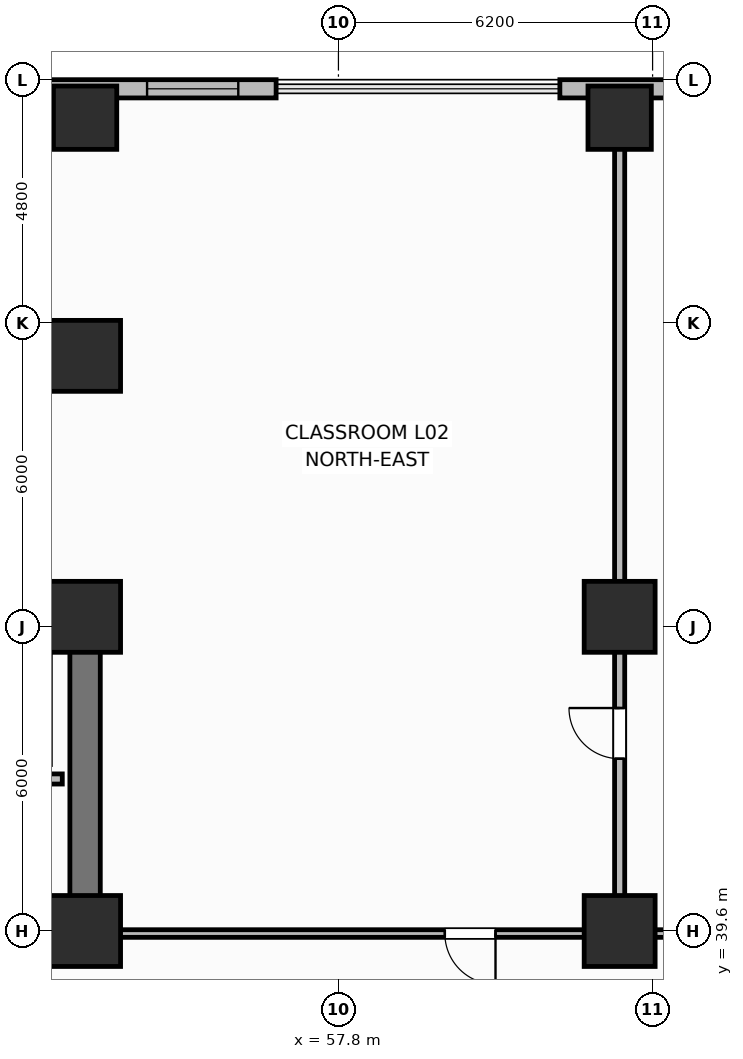
"""IFC4 building model, lengths in metres.
Left out: names, types, materials, properties, quantities, classifications, styles, units other than length and angle.
Written with IfcOpenShell. Run it as: python <this file> out.ifc"""

import sys

from ifc_helpers import new_model, si_unit, direction, frame, frame_2d, origin, origin_2d, place, context, subcontext, project, spatial, rectangle, extrude, element, fill, save


model = new_model("IFC4")
c1 = context("Model", 3, precision=1e-05, world=origin(), true_north=direction((0.0, 1.0)))
c2 = subcontext(c1, "Body", "Model", "MODEL_VIEW")
j1 = project(units=[si_unit("LENGTHUNIT", "METRE"), si_unit("PLANEANGLEUNIT", "RADIAN")], contexts=[c1])
p1 = place(None, origin())
s1 = spatial("IfcSite", under=j1, at=p1, CompositionType="ELEMENT")
p2 = place(p1, origin())
s2 = spatial("IfcBuilding", under=s1, at=p2, CompositionType="ELEMENT")
p3 = place(p2, frame((0.0, 0.0, 11.1)))
s3 = spatial("IfcBuildingStorey", under=s2, at=p3, CompositionType="ELEMENT", Elevation=11.1)
p4 = place(p3, frame((25.6, 45.8, 0.0), z_axis=(0.0, 0.0, 1.0), x_axis=(1.0, 0.0, 0.0)))
e1 = element("IfcWall", 1, at=p4, inside=s3, PredefinedType="SHEAR", context=c2, shape_type="SweptSolid", body=[
    extrude(rectangle(XDim=27.2, YDim=0.6, at=frame_2d((13.6, 0.0))), origin(), (0.0, 0.0, 1.0), 4.5),
])
p5 = place(p3, frame((52.8, 39.9, 0.0), z_axis=(0.0, 0.0, 1.0), x_axis=(0.0, 1.0, 0.0)))
e2 = element("IfcWall", 2, at=p5, inside=s3, PredefinedType="SHEAR", context=c2, shape_type="SweptSolid", body=[
    extrude(rectangle(XDim=5.6, YDim=0.6, at=frame_2d((2.8, 0.0))), origin(), (0.0, 0.0, 1.0), 4.5),
])
p6 = place(p3, frame((52.8, 39.6, 0.0), z_axis=(0.0, 0.0, 1.0), x_axis=(-1.0, 0.0, 0.0)))
e3 = element("IfcWall", 3, at=p6, inside=s3, PredefinedType="SHEAR", context=c2, shape_type="SweptSolid", body=[
    extrude(rectangle(XDim=27.2, YDim=0.6, at=frame_2d((13.6, 0.0))), origin(), (0.0, 0.0, 1.0), 4.5),
])
p7 = place(p6, frame((24.2, 0.0, 0.0)))
e4 = element("IfcOpeningElement", 4, at=p7, cuts=e3, PredefinedType="OPENING", context=c2, shape_type="SweptSolid", body=[
    extrude(rectangle(XDim=1.1, YDim=2.15, at=frame_2d((0.55, 1.075))), frame((0.0, 0.31, 0.0), z_axis=(0.0, -1.0, 0.0), x_axis=(1.0, 0.0, 0.0)), (0.0, 0.0, 1.0), 0.62),
])
p8 = place(p6, frame((15.1, 0.0, 0.0)))
e5 = element("IfcOpeningElement", 5, at=p8, cuts=e3, PredefinedType="OPENING", context=c2, shape_type="SweptSolid", body=[
    extrude(rectangle(XDim=1.2, YDim=2.15, at=frame_2d((0.6, 1.075))), frame((0.0, 0.31, 0.0), z_axis=(0.0, -1.0, 0.0), x_axis=(1.0, 0.0, 0.0)), (0.0, 0.0, 1.0), 0.62),
])
p9 = place(p6, frame((11.6, 0.0, 0.0)))
e6 = element("IfcOpeningElement", 6, at=p9, cuts=e3, PredefinedType="OPENING", context=c2, shape_type="SweptSolid", body=[
    extrude(rectangle(XDim=0.9, YDim=2.1, at=frame_2d((0.45, 1.05))), frame((0.0, 0.31, 0.0), z_axis=(0.0, -1.0, 0.0), x_axis=(1.0, 0.0, 0.0)), (0.0, 0.0, 1.0), 0.62),
])
p10 = place(p6, frame((3.6, 0.0, 0.0)))
e7 = element("IfcOpeningElement", 7, at=p10, cuts=e3, PredefinedType="OPENING", context=c2, shape_type="SweptSolid", body=[
    extrude(rectangle(XDim=1.0, YDim=2.15, at=frame_2d((0.5, 1.075))), frame((0.0, 0.31, 0.0), z_axis=(0.0, -1.0, 0.0), x_axis=(1.0, 0.0, 0.0)), (0.0, 0.0, 1.0), 0.62),
])
for number, where, z_axis, x_axis in (
    (8, (52.8, 39.6, 0.0), (0.0, 0.0, 1.0), (1.0, 0.0, 0.0)),
    (9, (52.8, 45.8, 0.0), (0.0, 0.0, 1.0), (1.0, 0.0, 0.0)),
):
    element("IfcColumn", number, at=place(p3, frame(where, z_axis=z_axis, x_axis=x_axis)), inside=s3, PredefinedType="COLUMN", context=c2, shape_type="SweptSolid", body=[
        extrude(rectangle(XDim=1.4, YDim=1.4, at=origin_2d()), origin(), (0.0, 0.0, 1.0), 4.5),
    ])
for number, where, z_axis, x_axis in (
    (10, (52.8, 55.65, 0.0), (0.0, 0.0, 1.0), (1.0, 0.0, 0.0)),
    (11, (63.35, 55.65, 0.0), (0.0, 0.0, 1.0), (1.0, 0.0, 0.0)),
):
    element("IfcColumn", number, at=place(p3, frame(where, z_axis=z_axis, x_axis=x_axis)), inside=s3, PredefinedType="COLUMN", context=c2, shape_type="SweptSolid", body=[
        extrude(rectangle(XDim=1.25, YDim=1.25, at=origin_2d()), origin(), (0.0, 0.0, 1.0), 4.5),
    ])
for number, where, z_axis, x_axis in (
    (12, (52.8, 50.95, 0.0), (0.0, 0.0, 1.0), (1.0, 0.0, 0.0)),
    (13, (63.35, 39.6, 0.0), (0.0, 0.0, 1.0), (1.0, 0.0, 0.0)),
    (14, (63.35, 45.8, 0.0), (0.0, 0.0, 1.0), (1.0, 0.0, 0.0)),
):
    element("IfcColumn", number, at=place(p3, frame(where, z_axis=z_axis, x_axis=x_axis)), inside=s3, PredefinedType="COLUMN", context=c2, shape_type="SweptSolid", body=[
        extrude(rectangle(XDim=1.4, YDim=1.4, at=origin_2d()), origin(), (0.0, 0.0, 1.0), 4.5),
    ])
p11 = place(p3, frame((77.42, 56.22, 0.0), z_axis=(0.0, 0.0, 1.0), x_axis=(-1.0, 0.0, 0.0)))
e15 = element("IfcWall", 15, at=p11, inside=s3, PredefinedType="SOLIDWALL", context=c2, shape_type="SweptSolid", body=[
    extrude(rectangle(XDim=15.25, YDim=0.36, at=frame_2d((7.625, 0.0))), origin(), (0.0, 0.0, 1.0), 3.48),
])
p12 = place(p11, frame((1.494, 0.0, 0.9)))
e16 = element("IfcOpeningElement", 16, at=p12, cuts=e15, PredefinedType="OPENING", context=c2, shape_type="SweptSolid", body=[
    extrude(rectangle(XDim=1.8, YDim=2.1, at=frame_2d((0.9, 1.05))), frame((0.0, 0.19, 0.0), z_axis=(0.0, -1.0, 0.0), x_axis=(1.0, 0.0, 0.0)), (0.0, 0.0, 1.0), 0.38),
])
p13 = place(p11, frame((8.469, 0.0, 0.9)))
e17 = element("IfcOpeningElement", 17, at=p13, cuts=e15, PredefinedType="OPENING", context=c2, shape_type="SweptSolid", body=[
    extrude(rectangle(XDim=1.8, YDim=2.1, at=frame_2d((0.9, 1.05))), frame((0.0, 0.19, 0.0), z_axis=(0.0, -1.0, 0.0), x_axis=(1.0, 0.0, 0.0)), (0.0, 0.0, 1.0), 0.38),
])
p14 = place(p11, frame((10.906, 0.0, 0.9)))
e18 = element("IfcOpeningElement", 18, at=p14, cuts=e15, PredefinedType="OPENING", context=c2, shape_type="SweptSolid", body=[
    extrude(rectangle(XDim=1.8, YDim=2.1, at=frame_2d((0.9, 1.05))), frame((0.0, 0.19, 0.0), z_axis=(0.0, -1.0, 0.0), x_axis=(1.0, 0.0, 0.0)), (0.0, 0.0, 1.0), 0.38),
])
p15 = place(p3, frame((56.57, 56.22, 0.0), z_axis=(0.0, 0.0, 1.0), x_axis=(-1.0, 0.0, 0.0)))
e19 = element("IfcWall", 19, at=p15, inside=s3, PredefinedType="SOLIDWALL", context=c2, shape_type="SweptSolid", body=[
    extrude(rectangle(XDim=55.59, YDim=0.36, at=frame_2d((27.795, 0.0))), origin(), (0.0, 0.0, 1.0), 3.48),
])
p16 = place(p15, frame((0.747, 0.0, 0.9)))
e20 = element("IfcOpeningElement", 20, at=p16, cuts=e19, PredefinedType="OPENING", context=c2, shape_type="SweptSolid", body=[
    extrude(rectangle(XDim=1.8, YDim=2.1, at=frame_2d((0.9, 1.05))), frame((0.0, 0.19, 0.0), z_axis=(0.0, -1.0, 0.0), x_axis=(1.0, 0.0, 0.0)), (0.0, 0.0, 1.0), 0.38),
])
p17 = place(p15, frame((5.19, 0.0, 0.9)))
e21 = element("IfcOpeningElement", 21, at=p17, cuts=e19, PredefinedType="OPENING", context=c2, shape_type="SweptSolid", body=[
    extrude(rectangle(XDim=1.8, YDim=2.1, at=frame_2d((0.9, 1.05))), frame((0.0, 0.19, 0.0), z_axis=(0.0, -1.0, 0.0), x_axis=(1.0, 0.0, 0.0)), (0.0, 0.0, 1.0), 0.38),
])
p18 = place(p15, frame((8.233, 0.0, 0.9)))
e22 = element("IfcOpeningElement", 22, at=p18, cuts=e19, PredefinedType="OPENING", context=c2, shape_type="SweptSolid", body=[
    extrude(rectangle(XDim=1.8, YDim=2.1, at=frame_2d((0.9, 1.05))), frame((0.0, 0.19, 0.0), z_axis=(0.0, -1.0, 0.0), x_axis=(1.0, 0.0, 0.0)), (0.0, 0.0, 1.0), 0.38),
])
p19 = place(p15, frame((11.626, 0.0, 0.9)))
e23 = element("IfcOpeningElement", 23, at=p19, cuts=e19, PredefinedType="OPENING", context=c2, shape_type="SweptSolid", body=[
    extrude(rectangle(XDim=1.8, YDim=2.1, at=frame_2d((0.9, 1.05))), frame((0.0, 0.19, 0.0), z_axis=(0.0, -1.0, 0.0), x_axis=(1.0, 0.0, 0.0)), (0.0, 0.0, 1.0), 0.38),
])
p20 = place(p15, frame((14.319, 0.0, 0.9)))
e24 = element("IfcOpeningElement", 24, at=p20, cuts=e19, PredefinedType="OPENING", context=c2, shape_type="SweptSolid", body=[
    extrude(rectangle(XDim=1.8, YDim=2.1, at=frame_2d((0.9, 1.05))), frame((0.0, 0.19, 0.0), z_axis=(0.0, -1.0, 0.0), x_axis=(1.0, 0.0, 0.0)), (0.0, 0.0, 1.0), 0.38),
])
p21 = place(p15, frame((18.762, 0.0, 0.9)))
e25 = element("IfcOpeningElement", 25, at=p21, cuts=e19, PredefinedType="OPENING", context=c2, shape_type="SweptSolid", body=[
    extrude(rectangle(XDim=1.8, YDim=2.1, at=frame_2d((0.9, 1.05))), frame((0.0, 0.19, 0.0), z_axis=(0.0, -1.0, 0.0), x_axis=(1.0, 0.0, 0.0)), (0.0, 0.0, 1.0), 0.38),
])
p22 = place(p15, frame((21.805, 0.0, 0.9)))
e26 = element("IfcOpeningElement", 26, at=p22, cuts=e19, PredefinedType="OPENING", context=c2, shape_type="SweptSolid", body=[
    extrude(rectangle(XDim=1.8, YDim=2.1, at=frame_2d((0.9, 1.05))), frame((0.0, 0.19, 0.0), z_axis=(0.0, -1.0, 0.0), x_axis=(1.0, 0.0, 0.0)), (0.0, 0.0, 1.0), 0.38),
])
p23 = place(p15, frame((25.198, 0.0, 0.9)))
e27 = element("IfcOpeningElement", 27, at=p23, cuts=e19, PredefinedType="OPENING", context=c2, shape_type="SweptSolid", body=[
    extrude(rectangle(XDim=1.8, YDim=2.1, at=frame_2d((0.9, 1.05))), frame((0.0, 0.19, 0.0), z_axis=(0.0, -1.0, 0.0), x_axis=(1.0, 0.0, 0.0)), (0.0, 0.0, 1.0), 0.38),
])
p24 = place(p15, frame((27.892, 0.0, 0.9)))
e28 = element("IfcOpeningElement", 28, at=p24, cuts=e19, PredefinedType="OPENING", context=c2, shape_type="SweptSolid", body=[
    extrude(rectangle(XDim=1.8, YDim=2.1, at=frame_2d((0.9, 1.05))), frame((0.0, 0.19, 0.0), z_axis=(0.0, -1.0, 0.0), x_axis=(1.0, 0.0, 0.0)), (0.0, 0.0, 1.0), 0.38),
])
p25 = place(p15, frame((32.335, 0.0, 0.9)))
e29 = element("IfcOpeningElement", 29, at=p25, cuts=e19, PredefinedType="OPENING", context=c2, shape_type="SweptSolid", body=[
    extrude(rectangle(XDim=1.8, YDim=2.1, at=frame_2d((0.9, 1.05))), frame((0.0, 0.19, 0.0), z_axis=(0.0, -1.0, 0.0), x_axis=(1.0, 0.0, 0.0)), (0.0, 0.0, 1.0), 0.38),
])
p26 = place(p15, frame((35.378, 0.0, 0.9)))
e30 = element("IfcOpeningElement", 30, at=p26, cuts=e19, PredefinedType="OPENING", context=c2, shape_type="SweptSolid", body=[
    extrude(rectangle(XDim=1.8, YDim=2.1, at=frame_2d((0.9, 1.05))), frame((0.0, 0.19, 0.0), z_axis=(0.0, -1.0, 0.0), x_axis=(1.0, 0.0, 0.0)), (0.0, 0.0, 1.0), 0.38),
])
p27 = place(p15, frame((38.421, 0.0, 0.9)))
e31 = element("IfcOpeningElement", 31, at=p27, cuts=e19, PredefinedType="OPENING", context=c2, shape_type="SweptSolid", body=[
    extrude(rectangle(XDim=1.8, YDim=2.1, at=frame_2d((0.9, 1.05))), frame((0.0, 0.19, 0.0), z_axis=(0.0, -1.0, 0.0), x_axis=(1.0, 0.0, 0.0)), (0.0, 0.0, 1.0), 0.38),
])
p28 = place(p15, frame((42.864, 0.0, 0.9)))
e32 = element("IfcOpeningElement", 32, at=p28, cuts=e19, PredefinedType="OPENING", context=c2, shape_type="SweptSolid", body=[
    extrude(rectangle(XDim=1.8, YDim=2.1, at=frame_2d((0.9, 1.05))), frame((0.0, 0.19, 0.0), z_axis=(0.0, -1.0, 0.0), x_axis=(1.0, 0.0, 0.0)), (0.0, 0.0, 1.0), 0.38),
])
p29 = place(p15, frame((45.557, 0.0, 0.9)))
e33 = element("IfcOpeningElement", 33, at=p29, cuts=e19, PredefinedType="OPENING", context=c2, shape_type="SweptSolid", body=[
    extrude(rectangle(XDim=1.8, YDim=2.1, at=frame_2d((0.9, 1.05))), frame((0.0, 0.19, 0.0), z_axis=(0.0, -1.0, 0.0), x_axis=(1.0, 0.0, 0.0)), (0.0, 0.0, 1.0), 0.38),
])
p30 = place(p15, frame((52.344, 0.0, 0.9)))
e34 = element("IfcOpeningElement", 34, at=p30, cuts=e19, PredefinedType="OPENING", context=c2, shape_type="SweptSolid", body=[
    extrude(rectangle(XDim=1.8, YDim=2.1, at=frame_2d((0.9, 1.05))), frame((0.0, 0.19, 0.0), z_axis=(0.0, -1.0, 0.0), x_axis=(1.0, 0.0, 0.0)), (0.0, 0.0, 1.0), 0.38),
])
p31 = place(p3, frame((52.35, 42.6, 0.0), z_axis=(0.0, 0.0, 1.0), x_axis=(-1.0, 0.0, 0.0)))
e35 = element("IfcWall", 35, at=p31, inside=s3, PredefinedType="PARTITIONING", context=c2, shape_type="SweptSolid", body=[
    extrude(rectangle(XDim=8.8, YDim=0.2, at=frame_2d((4.4, 0.0))), origin(), (0.0, 0.0, 1.0), 3.42),
])
p32 = place(p3, frame((63.35, 39.6, 0.0), z_axis=(0.0, 0.0, 1.0), x_axis=(0.0, 1.0, 0.0)))
e36 = element("IfcWall", 36, at=p32, inside=s3, PredefinedType="PARTITIONING", context=c2, shape_type="SweptSolid", body=[
    extrude(rectangle(XDim=16.4, YDim=0.2, at=frame_2d((8.2, 0.0))), origin(), (0.0, 0.0, 1.0), 3.42),
])
p33 = place(p32, frame((3.4, 0.0, 0.0)))
e37 = element("IfcOpeningElement", 37, at=p33, cuts=e36, PredefinedType="OPENING", context=c2, shape_type="SweptSolid", body=[
    extrude(rectangle(XDim=1.0, YDim=2.15, at=frame_2d((0.5, 1.075))), frame((0.0, 0.11, 0.0), z_axis=(0.0, -1.0, 0.0), x_axis=(1.0, 0.0, 0.0)), (0.0, 0.0, 1.0), 0.22),
])
p34 = place(p3, frame((66.4, 39.55, 0.0), z_axis=(0.0, 0.0, 1.0), x_axis=(-1.0, 0.0, 0.0)))
e38 = element("IfcWall", 38, at=p34, inside=s3, PredefinedType="PARTITIONING", context=c2, shape_type="SweptSolid", body=[
    extrude(rectangle(XDim=13.25, YDim=0.15, at=frame_2d((6.625, 0.0))), origin(), (0.0, 0.0, 1.0), 3.42),
])
p35 = place(p34, frame((5.5, 0.0, 0.0)))
e39 = element("IfcOpeningElement", 39, at=p35, cuts=e38, PredefinedType="OPENING", context=c2, shape_type="SweptSolid", body=[
    extrude(rectangle(XDim=1.0, YDim=2.15, at=frame_2d((0.5, 1.075))), frame((0.0, 0.085, 0.0), z_axis=(0.0, -1.0, 0.0), x_axis=(1.0, 0.0, 0.0)), (0.0, 0.0, 1.0), 0.17),
])
p36 = place(p16, origin())
e40 = element("IfcWindow", 40, at=p36, inside=s3, PartitioningType="SINGLE_PANEL", PredefinedType="WINDOW", context=c2, shape_type="SweptSolid", body=[
    extrude(rectangle(XDim=1.8, YDim=2.1, at=frame_2d((0.9, 1.05))), frame((0.0, 0.03, 0.0), z_axis=(0.0, -1.0, 0.0), x_axis=(1.0, 0.0, 0.0)), (0.0, 0.0, 1.0), 0.06),
])
fill(e20, e40)
p37 = place(p33, origin())
e41 = element("IfcDoor", 41, at=p37, inside=s3, OperationType="SINGLE_SWING_RIGHT", PredefinedType="DOOR", context=c2, shape_type="SweptSolid", body=[
    extrude(rectangle(XDim=1.0, YDim=2.15, at=frame_2d((0.5, 1.075))), frame((0.0, 0.025, 0.0), z_axis=(0.0, -1.0, 0.0), x_axis=(1.0, 0.0, 0.0)), (0.0, 0.0, 1.0), 0.05),
])
fill(e37, e41)
p38 = place(p35, origin())
e42 = element("IfcDoor", 42, at=p38, inside=s3, OperationType="SINGLE_SWING_LEFT", PredefinedType="DOOR", context=c2, shape_type="SweptSolid", body=[
    extrude(rectangle(XDim=1.0, YDim=2.15, at=frame_2d((0.5, 1.075))), frame((0.0, 0.025, 0.0), z_axis=(0.0, -1.0, 0.0), x_axis=(1.0, 0.0, 0.0)), (0.0, 0.0, 1.0), 0.05),
])
fill(e39, e42)
save(model, sys.argv[1])
